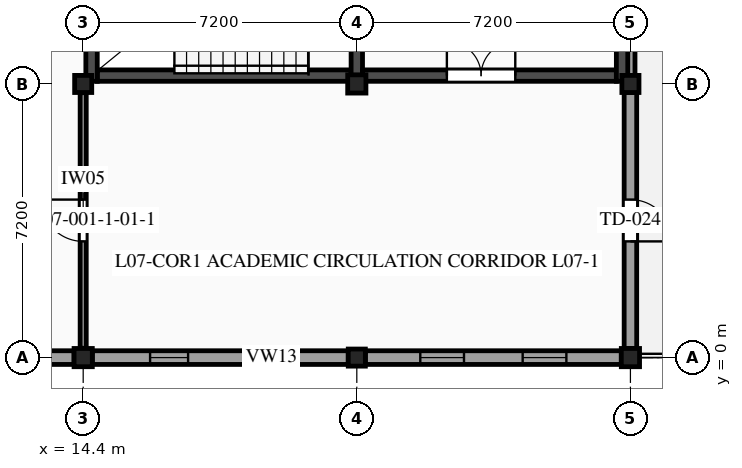
"""IFC4 building model, lengths in metres.
Left out: names, types, materials, properties, quantities, classifications, styles, units other than length and angle.
Written with IfcOpenShell. Run it as: python <this file> out.ifc"""

import sys

from ifc_helpers import new_model, si_unit, direction, frame, frame_2d, origin, origin_2d, place, context, subcontext, project, spatial, rectangle, extrude, element, fill, save


model = new_model("IFC4")
c1 = context("Model", 3, precision=1e-05, world=origin(), true_north=direction((0.0, 1.0)))
c2 = subcontext(c1, "Body", "Model", "MODEL_VIEW")
j1 = project(units=[si_unit("LENGTHUNIT", "METRE"), si_unit("PLANEANGLEUNIT", "RADIAN")], contexts=[c1])
p1 = place(None, origin())
s1 = spatial("IfcSite", under=j1, at=p1, CompositionType="ELEMENT")
p2 = place(p1, origin())
s2 = spatial("IfcBuilding", under=s1, at=p2, CompositionType="ELEMENT")
p3 = place(p2, frame((0.0, 0.0, 30.6)))
s3 = spatial("IfcBuildingStorey", under=s2, at=p3, CompositionType="ELEMENT", Elevation=30.6)
p4 = place(p3, frame((14.4, 0.0, 0.0), z_axis=(0.0, 0.0, 1.0), x_axis=(1.0, 0.0, 0.0)))
e1 = element("IfcColumn", 1, at=p4, inside=s3, PredefinedType="COLUMN", context=c2, shape_type="SweptSolid", body=[
    extrude(rectangle(XDim=0.48, YDim=0.48, at=origin_2d()), origin(), (0.0, 0.0, 1.0), 3.9),
])
for number, where, z_axis, x_axis in (
    (2, (14.4, 7.2, 0.0), (0.0, 0.0, 1.0), (1.0, 0.0, 0.0)),
    (3, (21.6, 0.0, 0.0), (0.0, 0.0, 1.0), (1.0, 0.0, 0.0)),
):
    element("IfcColumn", number, at=place(p3, frame(where, z_axis=z_axis, x_axis=x_axis)), inside=s3, PredefinedType="COLUMN", context=c2, shape_type="SweptSolid", body=[
        extrude(rectangle(XDim=0.45, YDim=0.45, at=origin_2d()), origin(), (0.0, 0.0, 1.0), 3.9),
    ])
for number, where, z_axis, x_axis in (
    (4, (21.6, 7.2, 0.0), (0.0, 0.0, 1.0), (1.0, 0.0, 0.0)),
    (5, (28.8, 0.0, 0.0), (0.0, 0.0, 1.0), (1.0, 0.0, 0.0)),
):
    element("IfcColumn", number, at=place(p3, frame(where, z_axis=z_axis, x_axis=x_axis)), inside=s3, PredefinedType="COLUMN", context=c2, shape_type="SweptSolid", body=[
        extrude(rectangle(XDim=0.48, YDim=0.48, at=origin_2d()), origin(), (0.0, 0.0, 1.0), 3.9),
    ])
p5 = place(p3, frame((28.8, 7.2, 0.0), z_axis=(0.0, 0.0, 1.0), x_axis=(1.0, 0.0, 0.0)))
e6 = element("IfcColumn", 6, at=p5, inside=s3, PredefinedType="COLUMN", context=c2, shape_type="SweptSolid", body=[
    extrude(rectangle(XDim=0.45, YDim=0.45, at=origin_2d()), origin(), (0.0, 0.0, 1.0), 3.9),
])
p6 = place(p3, frame((28.8, 14.16, 0.0), z_axis=(0.0, 0.0, 1.0), x_axis=(0.0, -1.0, 0.0)))
e7 = element("IfcWall", 7, at=p6, inside=s3, PredefinedType="STANDARD", context=c2, shape_type="SweptSolid", body=[
    extrude(rectangle(XDim=6.735, YDim=0.24, at=frame_2d((3.367, 0.0))), origin(), (0.0, 0.0, 1.0), 2.88),
])
p7 = place(p3, frame((28.8, 6.975, 0.0), z_axis=(0.0, 0.0, 1.0), x_axis=(0.0, -1.0, 0.0)))
e8 = element("IfcWall", 8, at=p7, inside=s3, PredefinedType="STANDARD", context=c2, shape_type="SweptSolid", body=[
    extrude(rectangle(XDim=6.735, YDim=0.33, at=frame_2d((3.368, 0.0))), origin(), (0.0, 0.0, 1.0), 2.88),
])
p8 = place(p7, frame((2.817, 0.0, 0.0)))
e9 = element("IfcOpeningElement", 9, at=p8, cuts=e8, PredefinedType="OPENING", context=c2, shape_type="SweptSolid", body=[
    extrude(rectangle(XDim=1.1, YDim=2.2, at=frame_2d((0.55, 1.1))), frame((0.0, 0.175, 0.0), z_axis=(0.0, -1.0, 0.0), x_axis=(1.0, 0.0, 0.0)), (0.0, 0.0, 1.0), 0.35),
])
p9 = place(p3, frame((28.56, 0.0, 0.0), z_axis=(0.0, 0.0, 1.0), x_axis=(-1.0, 0.0, 0.0)))
e10 = element("IfcWall", 10, at=p9, inside=s3, PredefinedType="STANDARD", context=c2, shape_type="SweptSolid", body=[
    extrude(rectangle(XDim=6.735, YDim=0.36, at=frame_2d((3.368, 0.0))), origin(), (0.0, 0.0, 1.0), 2.88),
])
p10 = place(p9, frame((1.446, 0.0, 1.15)))
e11 = element("IfcOpeningElement", 11, at=p10, cuts=e10, PredefinedType="OPENING", context=c2, shape_type="SweptSolid", body=[
    extrude(rectangle(XDim=1.15, YDim=1.2, at=frame_2d((0.575, 0.6))), frame((0.0, 0.19, 0.0), z_axis=(0.0, -1.0, 0.0), x_axis=(1.0, 0.0, 0.0)), (0.0, 0.0, 1.0), 0.38),
])
p11 = place(p9, frame((4.139, 0.0, 1.15)))
e12 = element("IfcOpeningElement", 12, at=p11, cuts=e10, PredefinedType="OPENING", context=c2, shape_type="SweptSolid", body=[
    extrude(rectangle(XDim=1.15, YDim=1.2, at=frame_2d((0.575, 0.6))), frame((0.0, 0.19, 0.0), z_axis=(0.0, -1.0, 0.0), x_axis=(1.0, 0.0, 0.0)), (0.0, 0.0, 1.0), 0.38),
])
p12 = place(p3, frame((21.375, 0.0, 0.0), z_axis=(0.0, 0.0, 1.0), x_axis=(-1.0, 0.0, 0.0)))
e13 = element("IfcWall", 13, at=p12, inside=s3, PredefinedType="STANDARD", context=c2, shape_type="SweptSolid", body=[
    extrude(rectangle(XDim=6.735, YDim=0.36, at=frame_2d((3.368, 0.0))), origin(), (0.0, 0.0, 1.0), 2.88),
])
p13 = place(p12, frame((1.521, 0.0, 1.15)))
e14 = element("IfcOpeningElement", 14, at=p13, cuts=e13, PredefinedType="OPENING", context=c2, shape_type="SweptSolid", body=[
    extrude(rectangle(XDim=1.0, YDim=1.2, at=frame_2d((0.5, 0.6))), frame((0.0, 0.19, 0.0), z_axis=(0.0, -1.0, 0.0), x_axis=(1.0, 0.0, 0.0)), (0.0, 0.0, 1.0), 0.38),
])
p14 = place(p12, frame((4.215, 0.0, 1.15)))
e15 = element("IfcOpeningElement", 15, at=p14, cuts=e13, PredefinedType="OPENING", context=c2, shape_type="SweptSolid", body=[
    extrude(rectangle(XDim=1.0, YDim=1.2, at=frame_2d((0.5, 0.6))), frame((0.0, 0.19, 0.0), z_axis=(0.0, -1.0, 0.0), x_axis=(1.0, 0.0, 0.0)), (0.0, 0.0, 1.0), 0.38),
])
p15 = place(p3, frame((14.16, 0.0, 0.0), z_axis=(0.0, 0.0, 1.0), x_axis=(-1.0, 0.0, 0.0)))
e16 = element("IfcWall", 16, at=p15, inside=s3, PredefinedType="STANDARD", context=c2, shape_type="SweptSolid", body=[
    extrude(rectangle(XDim=6.735, YDim=0.36, at=frame_2d((3.367, 0.0))), origin(), (0.0, 0.0, 1.0), 2.88),
])
p16 = place(p15, frame((1.595, 0.0, 1.15)))
e17 = element("IfcOpeningElement", 17, at=p16, cuts=e16, PredefinedType="OPENING", context=c2, shape_type="SweptSolid", body=[
    extrude(rectangle(XDim=0.85, YDim=1.25, at=frame_2d((0.425, 0.625))), frame((0.0, 0.19, 0.0), z_axis=(0.0, -1.0, 0.0), x_axis=(1.0, 0.0, 0.0)), (0.0, 0.0, 1.0), 0.38),
])
p17 = place(p15, frame((4.29, 0.0, 1.15)))
e18 = element("IfcOpeningElement", 18, at=p17, cuts=e16, PredefinedType="OPENING", context=c2, shape_type="SweptSolid", body=[
    extrude(rectangle(XDim=0.85, YDim=1.25, at=frame_2d((0.425, 0.625))), frame((0.0, 0.19, 0.0), z_axis=(0.0, -1.0, 0.0), x_axis=(1.0, 0.0, 0.0)), (0.0, 0.0, 1.0), 0.38),
])
p18 = place(p3, frame((14.77, 7.42, 0.0), z_axis=(0.0, 0.0, 1.0), x_axis=(1.0, 0.0, 0.0)))
e19 = element("IfcWall", 19, at=p18, inside=s3, PredefinedType="SHEAR", context=c2, shape_type="SweptSolid", body=[
    extrude(rectangle(XDim=6.68, YDim=0.3, at=frame_2d((3.34, 0.0))), origin(), (0.0, 0.0, 1.0), 3.685),
])
p19 = place(p3, frame((14.62, 14.33, 0.0), z_axis=(0.0, 0.0, 1.0), x_axis=(0.0, -1.0, 0.0)))
e20 = element("IfcWall", 20, at=p19, inside=s3, PredefinedType="SHEAR", context=c2, shape_type="SweptSolid", body=[
    extrude(rectangle(XDim=7.06, YDim=0.3, at=frame_2d((3.53, 0.0))), origin(), (0.0, 0.0, 1.0), 3.685),
])
p20 = place(p3, frame((21.6, 7.27, 0.0), z_axis=(0.0, 0.0, 1.0), x_axis=(0.0, 1.0, 0.0)))
e21 = element("IfcWall", 21, at=p20, inside=s3, PredefinedType="SHEAR", context=c2, shape_type="SweptSolid", body=[
    extrude(rectangle(XDim=7.06, YDim=0.3, at=frame_2d((3.53, 0.0))), origin(), (0.0, 0.0, 1.0), 3.685),
])
p21 = place(p20, frame((1.4, 0.0, 0.0)))
e22 = element("IfcOpeningElement", 22, at=p21, cuts=e21, PredefinedType="OPENING", context=c2, shape_type="SweptSolid", body=[
    extrude(rectangle(XDim=1.8, YDim=2.2, at=frame_2d((0.9, 1.1))), frame((0.0, 0.16, 0.0), z_axis=(0.0, -1.0, 0.0), x_axis=(1.0, 0.0, 0.0)), (0.0, 0.0, 1.0), 0.32),
])
p22 = place(p3, frame((21.75, 7.42, 0.0), z_axis=(0.0, 0.0, 1.0), x_axis=(1.0, 0.0, 0.0)))
e23 = element("IfcWall", 23, at=p22, inside=s3, PredefinedType="SHEAR", context=c2, shape_type="SweptSolid", body=[
    extrude(rectangle(XDim=6.68, YDim=0.3, at=frame_2d((3.34, 0.0))), origin(), (0.0, 0.0, 1.0), 3.685),
])
p23 = place(p22, frame((2.22, 0.0, 0.0)))
e24 = element("IfcOpeningElement", 24, at=p23, cuts=e23, PredefinedType="OPENING", context=c2, shape_type="SweptSolid", body=[
    extrude(rectangle(XDim=1.8, YDim=2.2, at=frame_2d((0.9, 1.1))), frame((0.0, 0.16, 0.0), z_axis=(0.0, -1.0, 0.0), x_axis=(1.0, 0.0, 0.0)), (0.0, 0.0, 1.0), 0.32),
])
p24 = place(p3, frame((28.58, 7.27, 0.0), z_axis=(0.0, 0.0, 1.0), x_axis=(0.0, 1.0, 0.0)))
e25 = element("IfcWall", 25, at=p24, inside=s3, PredefinedType="SHEAR", context=c2, shape_type="SweptSolid", body=[
    extrude(rectangle(XDim=7.06, YDim=0.3, at=frame_2d((3.53, 0.0))), origin(), (0.0, 0.0, 1.0), 3.685),
])
p25 = place(p3, frame((14.4, 0.245, 0.0), z_axis=(0.0, 0.0, 1.0), x_axis=(0.0, 1.0, 0.0)))
e26 = element("IfcWall", 26, at=p25, inside=s3, PredefinedType="PARTITIONING", context=c2, shape_type="SweptSolid", body=[
    extrude(rectangle(XDim=6.725, YDim=0.16, at=frame_2d((3.362, 0.0))), origin(), (0.0, 0.0, 1.0), 3.05),
])
p26 = place(p25, frame((2.812, 0.0, 0.0)))
e27 = element("IfcOpeningElement", 27, at=p26, cuts=e26, PredefinedType="OPENING", context=c2, shape_type="SweptSolid", body=[
    extrude(rectangle(XDim=1.1, YDim=2.15, at=frame_2d((0.55, 1.075))), frame((0.0, 0.09, 0.0), z_axis=(0.0, -1.0, 0.0), x_axis=(1.0, 0.0, 0.0)), (0.0, 0.0, 1.0), 0.18),
])
p27 = place(p8, origin())
e28 = element("IfcDoor", 28, at=p27, inside=s3, OperationType="SINGLE_SWING_RIGHT", PredefinedType="DOOR", context=c2, shape_type="SweptSolid", body=[
    extrude(rectangle(XDim=1.1, YDim=2.2, at=frame_2d((0.55, 1.1))), frame((0.0, 0.025, 0.0), z_axis=(0.0, -1.0, 0.0), x_axis=(1.0, 0.0, 0.0)), (0.0, 0.0, 1.0), 0.05),
])
fill(e9, e28)
p28 = place(p10, origin())
e29 = element("IfcWindow", 29, at=p28, inside=s3, PartitioningType="SINGLE_PANEL", PredefinedType="WINDOW", context=c2, shape_type="SweptSolid", body=[
    extrude(rectangle(XDim=1.15, YDim=1.2, at=frame_2d((0.575, 0.6))), frame((0.0, -0.08, 0.0), z_axis=(0.0, -1.0, 0.0), x_axis=(1.0, 0.0, 0.0)), (0.0, 0.0, 1.0), 0.06),
])
fill(e11, e29)
p29 = place(p11, origin())
e30 = element("IfcWindow", 30, at=p29, inside=s3, PartitioningType="SINGLE_PANEL", PredefinedType="WINDOW", context=c2, shape_type="SweptSolid", body=[
    extrude(rectangle(XDim=1.15, YDim=1.2, at=frame_2d((0.575, 0.6))), frame((0.0, -0.08, 0.0), z_axis=(0.0, -1.0, 0.0), x_axis=(1.0, 0.0, 0.0)), (0.0, 0.0, 1.0), 0.06),
])
fill(e12, e30)
p30 = place(p13, origin())
e31 = element("IfcWindow", 31, at=p30, inside=s3, PartitioningType="SINGLE_PANEL", PredefinedType="WINDOW", context=c2, shape_type="SweptSolid", body=[
    extrude(rectangle(XDim=1.0, YDim=1.2, at=frame_2d((0.5, 0.6))), frame((0.0, -0.08, 0.0), z_axis=(0.0, -1.0, 0.0), x_axis=(1.0, 0.0, 0.0)), (0.0, 0.0, 1.0), 0.06),
])
fill(e14, e31)
p31 = place(p14, origin())
e32 = element("IfcWindow", 32, at=p31, inside=s3, PartitioningType="SINGLE_PANEL", PredefinedType="WINDOW", context=c2, shape_type="SweptSolid", body=[
    extrude(rectangle(XDim=1.0, YDim=1.2, at=frame_2d((0.5, 0.6))), frame((0.0, -0.08, 0.0), z_axis=(0.0, -1.0, 0.0), x_axis=(1.0, 0.0, 0.0)), (0.0, 0.0, 1.0), 0.06),
])
fill(e15, e32)
p32 = place(p23, origin())
e33 = element("IfcDoor", 33, at=p32, inside=s3, OperationType="DOUBLE_DOOR_SINGLE_SWING", PredefinedType="DOOR", context=c2, shape_type="SweptSolid", body=[
    extrude(rectangle(XDim=1.8, YDim=2.2, at=frame_2d((0.9, 1.1))), frame((0.0, 0.025, 0.0), z_axis=(0.0, -1.0, 0.0), x_axis=(1.0, 0.0, 0.0)), (0.0, 0.0, 1.0), 0.05),
])
fill(e24, e33)
p33 = place(p26, origin())
e34 = element("IfcDoor", 34, at=p33, inside=s3, OperationType="SINGLE_SWING_RIGHT", PredefinedType="DOOR", context=c2, shape_type="SweptSolid", body=[
    extrude(rectangle(XDim=1.1, YDim=2.15, at=frame_2d((0.55, 1.075))), frame((0.0, 0.025, 0.0), z_axis=(0.0, -1.0, 0.0), x_axis=(1.0, 0.0, 0.0)), (0.0, 0.0, 1.0), 0.05),
])
fill(e27, e34)
save(model, sys.argv[1])
